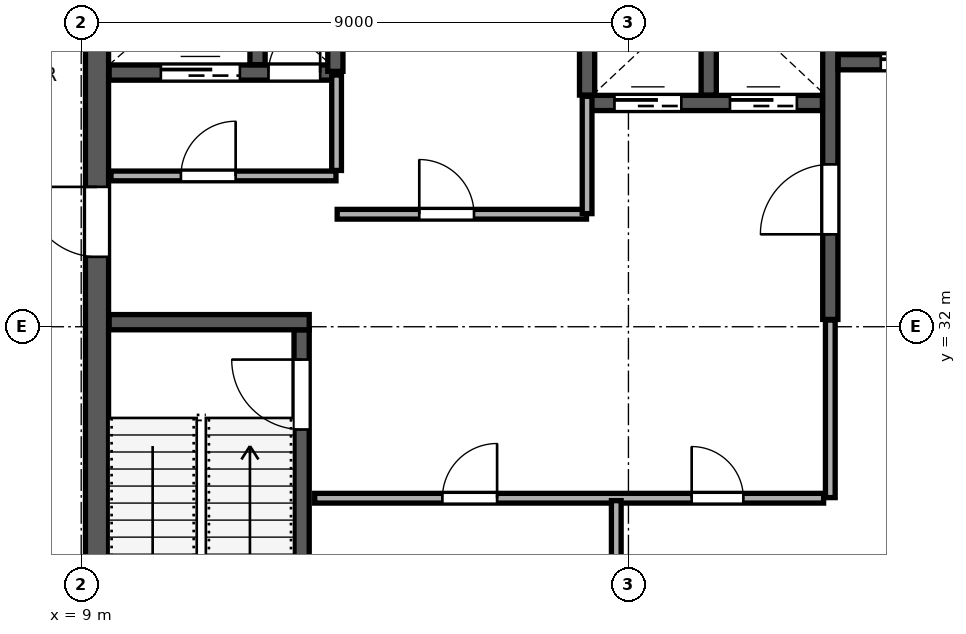
"""IFC4 building model, lengths in metres.
Left out: names, types, materials, properties, quantities, classifications, styles, units other than length and angle.
Written with IfcOpenShell. Run it as: python <this file> out.ifc"""

import sys

from ifc_helpers import new_model, si_unit, direction, frame, frame_2d, origin, place, context, subcontext, project, spatial, rectangle, extrude, source, transform, mapped, element, fill, save


model = new_model("IFC4")
c1 = context("Model", 3, precision=1e-05, world=origin(), true_north=direction((0.0, 1.0)))
c2 = subcontext(c1, "Body", "Model", "MODEL_VIEW")
j1 = project(units=[si_unit("LENGTHUNIT", "METRE"), si_unit("PLANEANGLEUNIT", "RADIAN")], contexts=[c1])
p1 = place(None, origin())
s1 = spatial("IfcSite", under=j1, at=p1, CompositionType="ELEMENT")
p2 = place(p1, origin())
s2 = spatial("IfcBuilding", under=s1, at=p2, CompositionType="ELEMENT")
p3 = place(p2, frame((0.0, 0.0, 332.4)))
s3 = spatial("IfcBuildingStorey", under=s2, at=p3, CompositionType="ELEMENT", Elevation=332.4)
p4 = place(p3, frame((9.26, 24.45, 0.0), z_axis=(0.0, 0.0, 1.0), x_axis=(0.0, 1.0, 0.0)))
e1 = element("IfcWall", 1, at=p4, inside=s3, PredefinedType="SHEAR", context=c2, shape_type="SweptSolid", body=[
    extrude(rectangle(XDim=15.1, YDim=0.38, at=frame_2d((7.55, 0.0))), origin(), (0.0, 0.0, 1.0), 3.96),
])
p5 = place(p4, frame((8.7, 0.0, 0.0)))
e2 = element("IfcOpeningElement", 2, at=p5, cuts=e1, PredefinedType="OPENING", context=c2, shape_type="SweptSolid", body=[
    extrude(rectangle(XDim=1.15, YDim=2.2, at=frame_2d((0.575, 1.1))), frame((0.0, 0.2, 0.0), z_axis=(0.0, -1.0, 0.0), x_axis=(1.0, 0.0, 0.0)), (0.0, 0.0, 1.0), 0.4),
])
p6 = place(p3, frame((12.625, 24.46, 0.0), z_axis=(0.0, 0.0, 1.0), x_axis=(0.0, 1.0, 0.0)))
e3 = element("IfcWall", 3, at=p6, inside=s3, PredefinedType="SHEAR", context=c2, shape_type="SweptSolid", body=[
    extrude(rectangle(XDim=7.49, YDim=0.25, at=frame_2d((3.745, 0.0))), origin(), (0.0, 0.0, 1.0), 3.96),
])
p7 = place(p6, frame((5.85, 0.0, 0.0)))
e4 = element("IfcOpeningElement", 4, at=p7, cuts=e3, PredefinedType="OPENING", context=c2, shape_type="SweptSolid", body=[
    extrude(rectangle(XDim=1.15, YDim=2.2, at=frame_2d((0.575, 1.1))), frame((0.0, 0.135, 0.0), z_axis=(0.0, -1.0, 0.0), x_axis=(1.0, 0.0, 0.0)), (0.0, 0.0, 1.0), 0.27),
])
p8 = place(p3, frame((9.46, 32.075, 0.0), z_axis=(0.0, 0.0, 1.0), x_axis=(1.0, 0.0, 0.0)))
e5 = element("IfcWall", 5, at=p8, inside=s3, PredefinedType="SHEAR", context=c2, shape_type="SweptSolid", body=[
    extrude(rectangle(XDim=3.29, YDim=0.25, at=frame_2d((1.645, 0.0))), origin(), (0.0, 0.0, 1.0), 3.96),
])
p9 = place(p3, frame((21.32, 32.12, 0.0), z_axis=(0.0, 0.0, 1.0), x_axis=(0.0, 1.0, 0.0)))
e6 = element("IfcWall", 6, at=p9, inside=s3, PredefinedType="SHEAR", context=c2, shape_type="SweptSolid", body=[
    extrude(rectangle(XDim=7.42, YDim=0.25, at=frame_2d((3.71, 0.0))), origin(), (0.0, 0.0, 1.0), 3.96),
])
p10 = place(p9, frame((1.4, 0.0, 0.0)))
e7 = element("IfcOpeningElement", 7, at=p10, cuts=e6, PredefinedType="OPENING", context=c2, shape_type="SweptSolid", body=[
    extrude(rectangle(XDim=1.15, YDim=2.2, at=frame_2d((0.575, 1.1))), frame((0.0, 0.135, 0.0), z_axis=(0.0, -1.0, 0.0), x_axis=(1.0, 0.0, 0.0)), (0.0, 0.0, 1.0), 0.27),
])
p11 = place(p3, frame((9.46, 36.18, 0.0), z_axis=(0.0, 0.0, 1.0), x_axis=(1.0, 0.0, 0.0)))
e8 = element("IfcWall", 8, at=p11, inside=s3, PredefinedType="SHEAR", context=c2, shape_type="SweptSolid", body=[
    extrude(rectangle(XDim=3.79, YDim=0.25, at=frame_2d((1.895, 0.0))), origin(), (0.0, 0.0, 1.0), 3.96),
])
p12 = place(p11, frame((2.62, 0.0, 0.0)))
e9 = element("IfcOpeningElement", 9, at=p12, cuts=e8, PredefinedType="OPENING", context=c2, shape_type="SweptSolid", body=[
    extrude(rectangle(XDim=0.85, YDim=2.1, at=frame_2d((0.425, 1.05))), frame((0.0, 0.135, 0.0), z_axis=(0.0, -1.0, 0.0), x_axis=(1.0, 0.0, 0.0)), (0.0, 0.0, 1.0), 0.27),
])
p13 = place(p11, frame((0.85, 0.0, 0.0)))
e10 = element("IfcOpeningElement", 10, at=p13, cuts=e8, PredefinedType="OPENING", context=c2, shape_type="SweptSolid", body=[
    extrude(rectangle(XDim=1.3, YDim=2.25, at=frame_2d((0.65, 1.125))), frame((0.0, 0.135, 0.0), z_axis=(0.0, -1.0, 0.0), x_axis=(1.0, 0.0, 0.0)), (0.0, 0.0, 1.0), 0.27),
])
p14 = place(p3, frame((11.9, 36.31, 0.0), z_axis=(0.0, 0.0, 1.0), x_axis=(0.0, 1.0, 0.0)))
e11 = element("IfcWall", 11, at=p14, inside=s3, PredefinedType="SHEAR", context=c2, shape_type="SweptSolid", body=[
    extrude(rectangle(XDim=3.23, YDim=0.25, at=frame_2d((1.615, 0.0))), origin(), (0.0, 0.0, 1.0), 3.96),
])
p15 = place(p3, frame((21.45, 36.35, 0.0), z_axis=(0.0, 0.0, 1.0), x_axis=(1.0, 0.0, 0.0)))
e12 = element("IfcWall", 12, at=p15, inside=s3, PredefinedType="SHEAR", context=c2, shape_type="SweptSolid", body=[
    extrude(rectangle(XDim=5.09, YDim=0.25, at=frame_2d((2.545, 0.0))), origin(), (0.0, 0.0, 1.0), 3.96),
])
p16 = place(p15, frame((0.7, 0.0, 0.0)))
e13 = element("IfcOpeningElement", 13, at=p16, cuts=e12, PredefinedType="OPENING", context=c2, shape_type="SweptSolid", body=[
    extrude(rectangle(XDim=1.2, YDim=2.2, at=frame_2d((0.6, 1.1))), frame((0.0, 0.135, 0.0), z_axis=(0.0, -1.0, 0.0), x_axis=(1.0, 0.0, 0.0)), (0.0, 0.0, 1.0), 0.27),
])
p17 = place(p15, frame((3.25, 0.0, 0.0)))
e14 = element("IfcOpeningElement", 14, at=p17, cuts=e12, PredefinedType="OPENING", context=c2, shape_type="SweptSolid", body=[
    extrude(rectangle(XDim=1.2, YDim=2.2, at=frame_2d((0.6, 1.1))), frame((0.0, 0.135, 0.0), z_axis=(0.0, -1.0, 0.0), x_axis=(1.0, 0.0, 0.0)), (0.0, 0.0, 1.0), 0.27),
])
p18 = place(p3, frame((13.18, 36.2, 0.0), z_axis=(0.0, 0.0, 1.0), x_axis=(0.0, 1.0, 0.0)))
e15 = element("IfcWall", 15, at=p18, inside=s3, PredefinedType="SHEAR", context=c2, shape_type="SweptSolid", body=[
    extrude(rectangle(XDim=3.34, YDim=0.25, at=frame_2d((1.67, 0.0))), origin(), (0.0, 0.0, 1.0), 3.96),
])
p19 = place(p3, frame((17.32, 35.68, 0.0), z_axis=(0.0, 0.0, 1.0), x_axis=(1.0, 0.0, 0.0)))
e16 = element("IfcWall", 16, at=p19, inside=s3, PredefinedType="SHEAR", context=c2, shape_type="SweptSolid", body=[
    extrude(rectangle(XDim=3.87, YDim=0.25, at=frame_2d((1.935, 0.0))), origin(), (0.0, 0.0, 1.0), 3.96),
])
p20 = place(p19, frame((0.45, 0.0, 0.0)))
e17 = element("IfcOpeningElement", 17, at=p20, cuts=e16, PredefinedType="OPENING", context=c2, shape_type="SweptSolid", body=[
    extrude(rectangle(XDim=1.1, YDim=2.2, at=frame_2d((0.55, 1.1))), frame((0.0, 0.135, 0.0), z_axis=(0.0, -1.0, 0.0), x_axis=(1.0, 0.0, 0.0)), (0.0, 0.0, 1.0), 0.27),
])
p21 = place(p19, frame((2.35, 0.0, 0.0)))
e18 = element("IfcOpeningElement", 18, at=p21, cuts=e16, PredefinedType="OPENING", context=c2, shape_type="SweptSolid", body=[
    extrude(rectangle(XDim=1.1, YDim=2.2, at=frame_2d((0.55, 1.1))), frame((0.0, 0.135, 0.0), z_axis=(0.0, -1.0, 0.0), x_axis=(1.0, 0.0, 0.0)), (0.0, 0.0, 1.0), 0.27),
])
for number, where, z_axis, x_axis in (
    (19, (17.32, 35.81, 0.0), (0.0, 0.0, 1.0), (0.0, 1.0, 0.0)),
    (20, (19.32, 35.81, 0.0), (0.0, 0.0, 1.0), (0.0, 1.0, 0.0)),
):
    element("IfcWall", number, at=place(p3, frame(where, z_axis=z_axis, x_axis=x_axis)), inside=s3, PredefinedType="SHEAR", context=c2, shape_type="SweptSolid", body=[
        extrude(rectangle(XDim=3.73, YDim=0.25, at=frame_2d((1.865, 0.0))), origin(), (0.0, 0.0, 1.0), 3.96),
    ])
p22 = place(p3, frame((9.49, 34.48, 0.0), z_axis=(0.0, 0.0, 1.0), x_axis=(1.0, 0.0, 0.0)))
e21 = element("IfcWall", 21, at=p22, inside=s3, PredefinedType="PARTITIONING", context=c2, shape_type="SweptSolid", body=[
    extrude(rectangle(XDim=3.7, YDim=0.16, at=frame_2d((1.85, 0.0))), origin(), (0.0, 0.0, 1.0), 3.96),
])
p23 = place(p22, frame((1.15, 0.0, 0.0)))
e22 = element("IfcOpeningElement", 22, at=p23, cuts=e21, PredefinedType="OPENING", context=c2, shape_type="SweptSolid", body=[
    extrude(rectangle(XDim=0.9, YDim=2.15, at=frame_2d((0.45, 1.075))), frame((0.0, 0.09, 0.0), z_axis=(0.0, -1.0, 0.0), x_axis=(1.0, 0.0, 0.0)), (0.0, 0.0, 1.0), 0.18),
])
p24 = place(p3, frame((13.2, 34.57, 0.0), z_axis=(0.0, 0.0, 1.0), x_axis=(0.0, 1.0, 0.0)))
e23 = element("IfcWall", 23, at=p24, inside=s3, PredefinedType="PARTITIONING", context=c2, shape_type="SweptSolid", body=[
    extrude(rectangle(XDim=1.57, YDim=0.16, at=frame_2d((0.785, 0.0))), origin(), (0.0, 0.0, 1.0), 3.96),
])
p25 = place(p3, frame((13.21, 33.85, 0.0), z_axis=(0.0, 0.0, 1.0), x_axis=(1.0, 0.0, 0.0)))
e24 = element("IfcWall", 24, at=p25, inside=s3, PredefinedType="PARTITIONING", context=c2, shape_type="SweptSolid", body=[
    extrude(rectangle(XDim=4.1, YDim=0.16, at=frame_2d((2.05, 0.0))), origin(), (0.0, 0.0, 1.0), 3.96),
])
p26 = place(p25, frame((1.35, 0.0, 0.0)))
e25 = element("IfcOpeningElement", 25, at=p26, cuts=e24, PredefinedType="OPENING", context=c2, shape_type="SweptSolid", body=[
    extrude(rectangle(XDim=0.9, YDim=2.15, at=frame_2d((0.45, 1.075))), frame((0.0, 0.09, 0.0), z_axis=(0.0, -1.0, 0.0), x_axis=(1.0, 0.0, 0.0)), (0.0, 0.0, 1.0), 0.18),
])
p27 = place(p3, frame((17.32, 33.86, 0.0), z_axis=(0.0, 0.0, 1.0), x_axis=(0.0, 1.0, 0.0)))
e26 = element("IfcWall", 26, at=p27, inside=s3, PredefinedType="PARTITIONING", context=c2, shape_type="SweptSolid", body=[
    extrude(rectangle(XDim=1.93, YDim=0.16, at=frame_2d((0.965, 0.0))), origin(), (0.0, 0.0, 1.0), 3.96),
])
p28 = place(p3, frame((12.84, 29.18, 0.0), z_axis=(0.0, 0.0, 1.0), x_axis=(1.0, 0.0, 0.0)))
e27 = element("IfcWall", 27, at=p28, inside=s3, PredefinedType="PARTITIONING", context=c2, shape_type="SweptSolid", body=[
    extrude(rectangle(XDim=8.37, YDim=0.16, at=frame_2d((4.185, 0.0))), origin(), (0.0, 0.0, 1.0), 3.96),
])
p29 = place(p28, frame((2.1, 0.0, 0.0)))
e28 = element("IfcOpeningElement", 28, at=p29, cuts=e27, PredefinedType="OPENING", context=c2, shape_type="SweptSolid", body=[
    extrude(rectangle(XDim=0.9, YDim=2.15, at=frame_2d((0.45, 1.075))), frame((0.0, 0.09, 0.0), z_axis=(0.0, -1.0, 0.0), x_axis=(1.0, 0.0, 0.0)), (0.0, 0.0, 1.0), 0.18),
])
p30 = place(p28, frame((6.2, 0.0, 0.0)))
e29 = element("IfcOpeningElement", 29, at=p30, cuts=e27, PredefinedType="OPENING", context=c2, shape_type="SweptSolid", body=[
    extrude(rectangle(XDim=0.85, YDim=2.1, at=frame_2d((0.425, 1.05))), frame((0.0, 0.09, 0.0), z_axis=(0.0, -1.0, 0.0), x_axis=(1.0, 0.0, 0.0)), (0.0, 0.0, 1.0), 0.18),
])
p31 = place(p3, frame((17.8, 24.54, 0.0), z_axis=(0.0, 0.0, 1.0), x_axis=(0.0, 1.0, 0.0)))
e30 = element("IfcWall", 30, at=p31, inside=s3, PredefinedType="PARTITIONING", context=c2, shape_type="SweptSolid", body=[
    extrude(rectangle(XDim=4.6, YDim=0.16, at=frame_2d((2.3, 0.0))), origin(), (0.0, 0.0, 1.0), 3.96),
])
p32 = place(p3, frame((21.32, 29.19, 0.0), z_axis=(0.0, 0.0, 1.0), x_axis=(0.0, 1.0, 0.0)))
e31 = element("IfcWall", 31, at=p32, inside=s3, PredefinedType="PARTITIONING", context=c2, shape_type="SweptSolid", body=[
    extrude(rectangle(XDim=2.92, YDim=0.16, at=frame_2d((1.46, 0.0))), origin(), (0.0, 0.0, 1.0), 3.96),
])
m1 = source(origin(), c2, "Body", "SweptSolid", [
    extrude(rectangle(XDim=1.15, YDim=2.2, at=frame_2d((0.575, 1.1))), frame((0.0, 0.025, 0.0), z_axis=(0.0, -1.0, 0.0), x_axis=(1.0, 0.0, 0.0)), (0.0, 0.0, 1.0), 0.05),
])
p33 = place(p7, origin())
e32 = element("IfcDoor", 32, at=p33, inside=s3, OperationType="SINGLE_SWING_RIGHT", PredefinedType="DOOR", context=c2, shape_type="MappedRepresentation", body=[
    mapped(m1, transform((0.0, 0.0, 0.0), scale=1.0)),
])
fill(e4, e32)
m2 = source(origin(), c2, "Body", "SweptSolid", [
    extrude(rectangle(XDim=1.15, YDim=2.2, at=frame_2d((0.575, 1.1))), frame((0.0, 0.025, 0.0), z_axis=(0.0, -1.0, 0.0), x_axis=(1.0, 0.0, 0.0)), (0.0, 0.0, 1.0), 0.05),
])
p34 = place(p10, origin())
e33 = element("IfcDoor", 33, at=p34, inside=s3, OperationType="SINGLE_SWING_LEFT", PredefinedType="DOOR", context=c2, shape_type="MappedRepresentation", body=[
    mapped(m2, transform((0.0, 0.0, 0.0), scale=1.0)),
])
fill(e7, e33)
p35 = place(p5, origin())
e34 = element("IfcDoor", 34, at=p35, inside=s3, OperationType="SINGLE_SWING_RIGHT", PredefinedType="DOOR", context=c2, shape_type="MappedRepresentation", body=[
    mapped(m2, transform((0.0, 0.0, 0.0), scale=1.0)),
])
fill(e2, e34)
m3 = source(origin(), c2, "Body", "SweptSolid", [
    extrude(rectangle(XDim=0.85, YDim=2.1, at=frame_2d((0.425, 1.05))), frame((0.0, 0.025, 0.0), z_axis=(0.0, -1.0, 0.0), x_axis=(1.0, 0.0, 0.0)), (0.0, 0.0, 1.0), 0.05),
])
p36 = place(p12, origin())
e35 = element("IfcDoor", 35, at=p36, inside=s3, OperationType="SINGLE_SWING_RIGHT", PredefinedType="DOOR", context=c2, shape_type="MappedRepresentation", body=[
    mapped(m3, transform((0.0, 0.0, 0.0), scale=1.0)),
])
fill(e9, e35)
m4 = source(origin(), c2, "Body", "SweptSolid", [
    extrude(rectangle(XDim=1.1, YDim=2.2, at=frame_2d((0.55, 1.1))), frame((0.0, 0.025, 0.0), z_axis=(0.0, -1.0, 0.0), x_axis=(1.0, 0.0, 0.0)), (0.0, 0.0, 1.0), 0.05),
])
p37 = place(p20, origin())
e36 = element("IfcDoor", 36, at=p37, inside=s3, OperationType="SLIDING_TO_LEFT", PredefinedType="DOOR", context=c2, shape_type="MappedRepresentation", body=[
    mapped(m4, transform((0.0, 0.0, 0.0), scale=1.0)),
])
fill(e17, e36)
p38 = place(p21, origin())
e37 = element("IfcDoor", 37, at=p38, inside=s3, OperationType="SLIDING_TO_RIGHT", PredefinedType="DOOR", context=c2, shape_type="MappedRepresentation", body=[
    mapped(m4, transform((0.0, 0.0, 0.0), scale=1.0)),
])
fill(e18, e37)
m5 = source(origin(), c2, "Body", "SweptSolid", [
    extrude(rectangle(XDim=1.2, YDim=2.2, at=frame_2d((0.6, 1.1))), frame((0.0, 0.025, 0.0), z_axis=(0.0, -1.0, 0.0), x_axis=(1.0, 0.0, 0.0)), (0.0, 0.0, 1.0), 0.05),
])
p39 = place(p16, origin())
e38 = element("IfcDoor", 38, at=p39, inside=s3, OperationType="SLIDING_TO_LEFT", PredefinedType="DOOR", context=c2, shape_type="MappedRepresentation", body=[
    mapped(m5, transform((0.0, 0.0, 0.0), scale=1.0)),
])
fill(e13, e38)
m6 = source(origin(), c2, "Body", "SweptSolid", [
    extrude(rectangle(XDim=1.3, YDim=2.25, at=frame_2d((0.65, 1.125))), frame((0.0, 0.025, 0.0), z_axis=(0.0, -1.0, 0.0), x_axis=(1.0, 0.0, 0.0)), (0.0, 0.0, 1.0), 0.05),
])
p40 = place(p13, origin())
e39 = element("IfcDoor", 39, at=p40, inside=s3, OperationType="SLIDING_TO_LEFT", PredefinedType="DOOR", context=c2, shape_type="MappedRepresentation", body=[
    mapped(m6, transform((0.0, 0.0, 0.0), scale=1.0)),
])
fill(e10, e39)
m7 = source(origin(), c2, "Body", "SweptSolid", [
    extrude(rectangle(XDim=0.9, YDim=2.15, at=frame_2d((0.45, 1.075))), frame((0.0, 0.025, 0.0), z_axis=(0.0, -1.0, 0.0), x_axis=(1.0, 0.0, 0.0)), (0.0, 0.0, 1.0), 0.05),
])
p41 = place(p23, origin())
e40 = element("IfcDoor", 40, at=p41, inside=s3, OperationType="SINGLE_SWING_RIGHT", PredefinedType="DOOR", context=c2, shape_type="MappedRepresentation", body=[
    mapped(m7, transform((0.0, 0.0, 0.0), scale=1.0)),
])
fill(e22, e40)
p42 = place(p26, origin())
e41 = element("IfcDoor", 41, at=p42, inside=s3, OperationType="SINGLE_SWING_LEFT", PredefinedType="DOOR", context=c2, shape_type="MappedRepresentation", body=[
    mapped(m7, transform((0.0, 0.0, 0.0), scale=1.0)),
])
fill(e25, e41)
p43 = place(p29, origin())
e42 = element("IfcDoor", 42, at=p43, inside=s3, OperationType="SINGLE_SWING_RIGHT", PredefinedType="DOOR", context=c2, shape_type="MappedRepresentation", body=[
    mapped(m7, transform((0.0, 0.0, 0.0), scale=1.0)),
])
fill(e28, e42)
p44 = place(p30, origin())
e43 = element("IfcDoor", 43, at=p44, inside=s3, OperationType="SINGLE_SWING_LEFT", PredefinedType="DOOR", context=c2, shape_type="MappedRepresentation", body=[
    mapped(m3, transform((0.0, 0.0, 0.0), scale=1.0)),
])
fill(e29, e43)
save(model, sys.argv[1])
